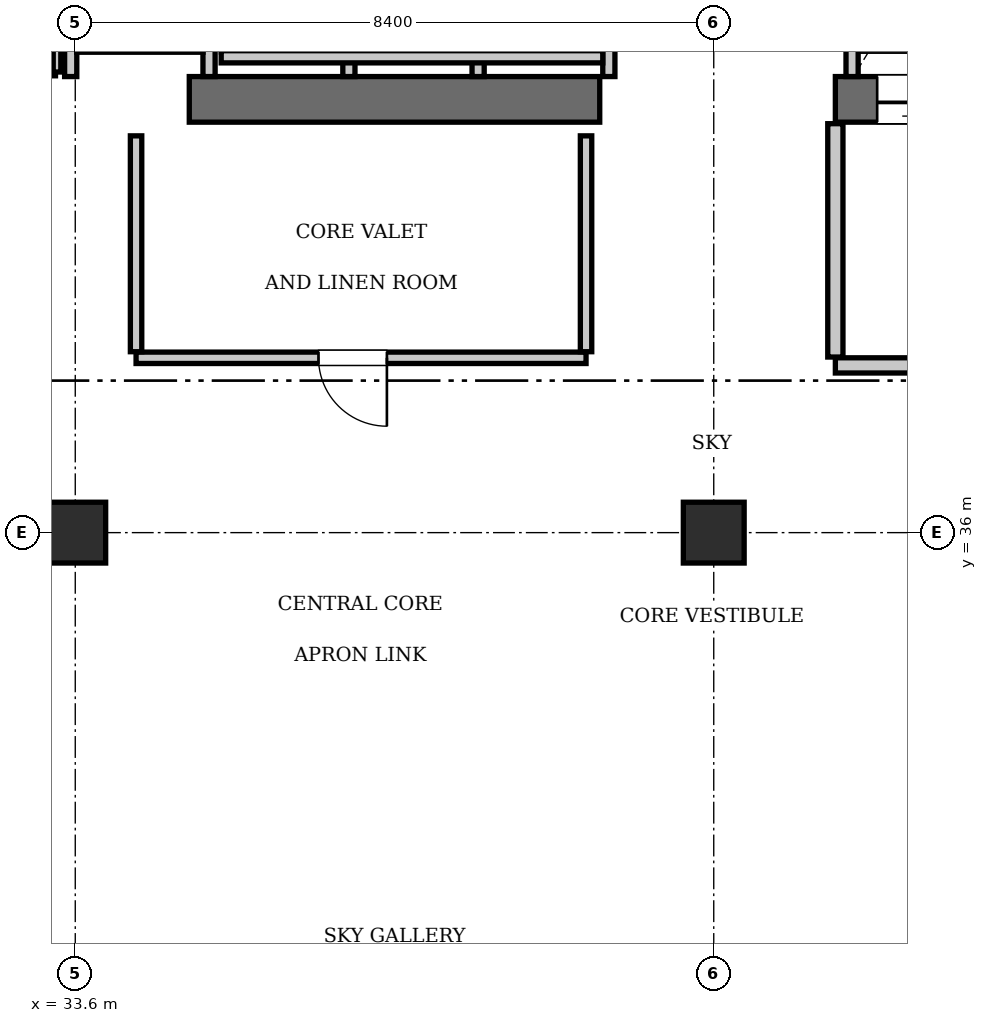
"""IFC4 building model, lengths in metres.
Left out: names, types, materials, properties, quantities, classifications, styles, units other than length and angle.
Written with IfcOpenShell. Run it as: python <this file> out.ifc"""

import sys

from ifc_helpers import new_model, si_unit, direction, frame, frame_2d, origin, origin_2d, place, context, subcontext, project, spatial, rectangle, extrude, element, fill, save


model = new_model("IFC4")
c1 = context("Model", 3, precision=1e-05, world=origin(), true_north=direction((0.0, 1.0)))
c2 = subcontext(c1, "Body", "Model", "MODEL_VIEW")
j1 = project(units=[si_unit("LENGTHUNIT", "METRE"), si_unit("PLANEANGLEUNIT", "RADIAN")], contexts=[c1])
p1 = place(None, origin())
s1 = spatial("IfcSite", under=j1, at=p1, CompositionType="ELEMENT")
p2 = place(p1, origin())
s2 = spatial("IfcBuilding", under=s1, at=p2, CompositionType="ELEMENT")
p3 = place(p2, frame((0.0, 0.0, 341.25)))
s3 = spatial("IfcBuildingStorey", under=s2, at=p3, CompositionType="ELEMENT", Elevation=341.25)
p4 = place(p3, frame((35.1, 41.7, 0.0), z_axis=(0.0, 0.0, 1.0), x_axis=(1.0, 0.0, 0.0)))
e1 = element("IfcWall", 1, at=p4, inside=s3, PredefinedType="SHEAR", context=c2, shape_type="SweptSolid", body=[
    extrude(rectangle(XDim=5.4, YDim=0.6, at=frame_2d((2.7, 0.0))), origin(), (0.0, 0.0, 1.0), 3.85),
])
p5 = place(p3, frame((43.6, 41.7, 0.0), z_axis=(0.0, 0.0, 1.0), x_axis=(1.0, 0.0, 0.0)))
e2 = element("IfcWall", 2, at=p5, inside=s3, PredefinedType="SHEAR", context=c2, shape_type="SweptSolid", body=[
    extrude(rectangle(XDim=6.8, YDim=0.6, at=frame_2d((3.4, 0.0))), origin(), (0.0, 0.0, 1.0), 3.85),
])
p6 = place(p5, frame((3.9, 0.0, 0.0)))
e3 = element("IfcOpeningElement", 3, at=p6, cuts=e2, PredefinedType="OPENING", context=c2, shape_type="SweptSolid", body=[
    extrude(rectangle(XDim=1.15, YDim=2.15, at=frame_2d((0.575, 1.075))), frame((0.0, 0.31, 0.0), z_axis=(0.0, -1.0, 0.0), x_axis=(1.0, 0.0, 0.0)), (0.0, 0.0, 1.0), 0.62),
])
p7 = place(p5, frame((0.55, 0.0, 0.0)))
e4 = element("IfcOpeningElement", 4, at=p7, cuts=e2, PredefinedType="OPENING", context=c2, shape_type="SweptSolid", body=[
    extrude(rectangle(XDim=1.1, YDim=2.2, at=frame_2d((0.55, 1.1))), frame((0.0, 0.31, 0.0), z_axis=(0.0, -1.0, 0.0), x_axis=(1.0, 0.0, 0.0)), (0.0, 0.0, 1.0), 0.62),
])
for number, where, z_axis, x_axis in (
    (5, (33.6, 36.0, 0.0), (0.0, 0.0, 1.0), (1.0, 0.0, 0.0)),
    (6, (42.0, 36.0, 0.0), (0.0, 0.0, 1.0), (1.0, 0.0, 0.0)),
):
    element("IfcColumn", number, at=place(p3, frame(where, z_axis=z_axis, x_axis=x_axis)), inside=s3, PredefinedType="COLUMN", context=c2, shape_type="SweptSolid", body=[
        extrude(rectangle(XDim=0.8, YDim=0.8, at=origin_2d()), origin(), (0.0, 0.0, 1.0), 3.85),
    ])
p8 = place(p3, frame((43.82, 42.0, 0.0), z_axis=(0.0, 0.0, 1.0), x_axis=(0.0, 1.0, 0.0)))
e7 = element("IfcWall", 7, at=p8, inside=s3, PredefinedType="SOLIDWALL", context=c2, shape_type="SweptSolid", body=[
    extrude(rectangle(XDim=2.74, YDim=0.16, at=frame_2d((1.37, 0.0))), origin(), (0.0, 0.0, 1.0), 3.61),
])
for number, where, z_axis, x_axis in (
    (8, (37.2, 42.0, 0.0), (0.0, 0.0, 1.0), (0.0, 1.0, 0.0)),
    (9, (38.9, 42.0, 0.0), (0.0, 0.0, 1.0), (0.0, 1.0, 0.0)),
    (10, (40.62, 42.0, 0.0), (0.0, 0.0, 1.0), (0.0, 1.0, 0.0)),
):
    element("IfcWall", number, at=place(p3, frame(where, z_axis=z_axis, x_axis=x_axis)), inside=s3, PredefinedType="SOLIDWALL", context=c2, shape_type="SweptSolid", body=[
        extrude(rectangle(XDim=2.35, YDim=0.16, at=frame_2d((1.175, 0.0))), origin(), (0.0, 0.0, 1.0), 3.61),
    ])
p9 = place(p3, frame((35.52, 42.26, 0.0), z_axis=(0.0, 0.0, 1.0), x_axis=(1.0, 0.0, 0.0)))
e11 = element("IfcWall", 11, at=p9, inside=s3, PredefinedType="SOLIDWALL", context=c2, shape_type="SweptSolid", body=[
    extrude(rectangle(XDim=5.02, YDim=0.16, at=frame_2d((2.51, 0.0))), origin(), (0.0, 0.0, 1.0), 3.61),
])
for number, where, z_axis, x_axis in (
    (12, (33.54, 42.0, 0.0), (0.0, 0.0, 1.0), (0.0, 1.0, 0.0)),
    (13, (35.36, 42.0, 0.0), (0.0, 0.0, 1.0), (0.0, 1.0, 0.0)),
):
    element("IfcWall", number, at=place(p3, frame(where, z_axis=z_axis, x_axis=x_axis)), inside=s3, PredefinedType="SOLIDWALL", context=c2, shape_type="SweptSolid", body=[
        extrude(rectangle(XDim=2.4, YDim=0.16, at=frame_2d((1.2, 0.0))), origin(), (0.0, 0.0, 1.0), 3.61),
    ])
p10 = place(p3, frame((33.62, 42.4, 0.0), z_axis=(0.0, 0.0, 1.0), x_axis=(1.0, 0.0, 0.0)))
e14 = element("IfcWall", 14, at=p10, inside=s3, PredefinedType="SOLIDWALL", context=c2, shape_type="SweptSolid", body=[
    extrude(rectangle(XDim=1.66, YDim=0.16, at=frame_2d((0.83, 0.0))), origin(), (0.0, 0.0, 1.0), 3.61),
])
p11 = place(p3, frame((43.6, 38.2, 0.0), z_axis=(0.0, 0.0, 1.0), x_axis=(1.0, 0.0, 0.0)))
e15 = element("IfcWall", 15, at=p11, inside=s3, PredefinedType="PARTITIONING", context=c2, shape_type="SweptSolid", body=[
    extrude(rectangle(XDim=5.8, YDim=0.2, at=frame_2d((2.9, 0.0))), origin(), (0.0, 0.0, 1.0), 3.61),
])
p12 = place(p11, frame((2.3, 0.0, 0.0)))
e16 = element("IfcOpeningElement", 16, at=p12, cuts=e15, PredefinedType="OPENING", context=c2, shape_type="SweptSolid", body=[
    extrude(rectangle(XDim=1.15, YDim=2.15, at=frame_2d((0.575, 1.075))), frame((0.0, 0.11, 0.0), z_axis=(0.0, -1.0, 0.0), x_axis=(1.0, 0.0, 0.0)), (0.0, 0.0, 1.0), 0.22),
])
p13 = place(p3, frame((43.6, 38.31, 0.0), z_axis=(0.0, 0.0, 1.0), x_axis=(0.0, 1.0, 0.0)))
e17 = element("IfcWall", 17, at=p13, inside=s3, PredefinedType="PARTITIONING", context=c2, shape_type="SweptSolid", body=[
    extrude(rectangle(XDim=3.07, YDim=0.2, at=frame_2d((1.535, 0.0))), origin(), (0.0, 0.0, 1.0), 3.61),
])
p14 = place(p3, frame((32.02, 42.06, 0.0), z_axis=(0.0, 0.0, 1.0), x_axis=(1.0, 0.0, 0.0)))
e18 = element("IfcWall", 18, at=p14, inside=s3, PredefinedType="PARTITIONING", context=c2, shape_type="SweptSolid", body=[
    extrude(rectangle(XDim=1.32, YDim=0.1, at=frame_2d((0.66, 0.0))), origin(), (0.0, 0.0, 1.0), 3.61),
])
p15 = place(p14, frame((0.24, 0.0, 0.0)))
e19 = element("IfcOpeningElement", 19, at=p15, cuts=e18, PredefinedType="OPENING", context=c2, shape_type="SweptSolid", body=[
    extrude(rectangle(XDim=0.8, YDim=2.05, at=frame_2d((0.4, 1.025))), frame((0.0, 0.06, 0.0), z_axis=(0.0, -1.0, 0.0), x_axis=(1.0, 0.0, 0.0)), (0.0, 0.0, 1.0), 0.12),
])
p16 = place(p3, frame((33.36, 42.06, 0.0), z_axis=(0.0, 0.0, 1.0), x_axis=(0.0, 1.0, 0.0)))
e20 = element("IfcWall", 20, at=p16, inside=s3, PredefinedType="PARTITIONING", context=c2, shape_type="SweptSolid", body=[
    extrude(rectangle(XDim=2.88, YDim=0.1, at=frame_2d((1.44, 0.0))), origin(), (0.0, 0.0, 1.0), 3.61),
])
p17 = place(p3, frame((34.4, 38.3, 0.0), z_axis=(0.0, 0.0, 1.0), x_axis=(1.0, 0.0, 0.0)))
e21 = element("IfcWall", 21, at=p17, inside=s3, PredefinedType="PARTITIONING", context=c2, shape_type="SweptSolid", body=[
    extrude(rectangle(XDim=5.92, YDim=0.15, at=frame_2d((2.96, 0.0))), origin(), (0.0, 0.0, 1.0), 3.61),
])
p18 = place(p17, frame((2.4, 0.0, 0.0)))
e22 = element("IfcOpeningElement", 22, at=p18, cuts=e21, PredefinedType="OPENING", context=c2, shape_type="SweptSolid", body=[
    extrude(rectangle(XDim=0.9, YDim=2.1, at=frame_2d((0.45, 1.05))), frame((0.0, 0.085, 0.0), z_axis=(0.0, -1.0, 0.0), x_axis=(1.0, 0.0, 0.0)), (0.0, 0.0, 1.0), 0.17),
])
for number, where, z_axis, x_axis in (
    (23, (34.4, 38.38, 0.0), (0.0, 0.0, 1.0), (0.0, 1.0, 0.0)),
    (24, (40.32, 38.38, 0.0), (0.0, 0.0, 1.0), (0.0, 1.0, 0.0)),
):
    element("IfcWall", number, at=place(p3, frame(where, z_axis=z_axis, x_axis=x_axis)), inside=s3, PredefinedType="PARTITIONING", context=c2, shape_type="SweptSolid", body=[
        extrude(rectangle(XDim=2.84, YDim=0.15, at=frame_2d((1.42, 0.0))), origin(), (0.0, 0.0, 1.0), 3.61),
    ])
p19 = place(p7, frame((1.1, 0.0, 0.0), z_axis=(0.0, 0.0, 1.0), x_axis=(-1.0, 0.0, 0.0)))
e25 = element("IfcDoor", 25, at=p19, inside=s3, OperationType="SLIDING_TO_LEFT", PredefinedType="DOOR", context=c2, shape_type="SweptSolid", body=[
    extrude(rectangle(XDim=1.1, YDim=2.2, at=frame_2d((0.55, 1.1))), frame((0.0, 0.025, 0.0), z_axis=(0.0, -1.0, 0.0), x_axis=(1.0, 0.0, 0.0)), (0.0, 0.0, 1.0), 0.05),
])
fill(e4, e25)
p20 = place(p18, frame((0.9, 0.0, 0.0), z_axis=(0.0, 0.0, 1.0), x_axis=(-1.0, 0.0, 0.0)))
e26 = element("IfcDoor", 26, at=p20, inside=s3, OperationType="SINGLE_SWING_LEFT", PredefinedType="DOOR", context=c2, shape_type="SweptSolid", body=[
    extrude(rectangle(XDim=0.9, YDim=2.1, at=frame_2d((0.45, 1.05))), frame((0.0, 0.025, 0.0), z_axis=(0.0, -1.0, 0.0), x_axis=(1.0, 0.0, 0.0)), (0.0, 0.0, 1.0), 0.05),
])
fill(e22, e26)
save(model, sys.argv[1])
